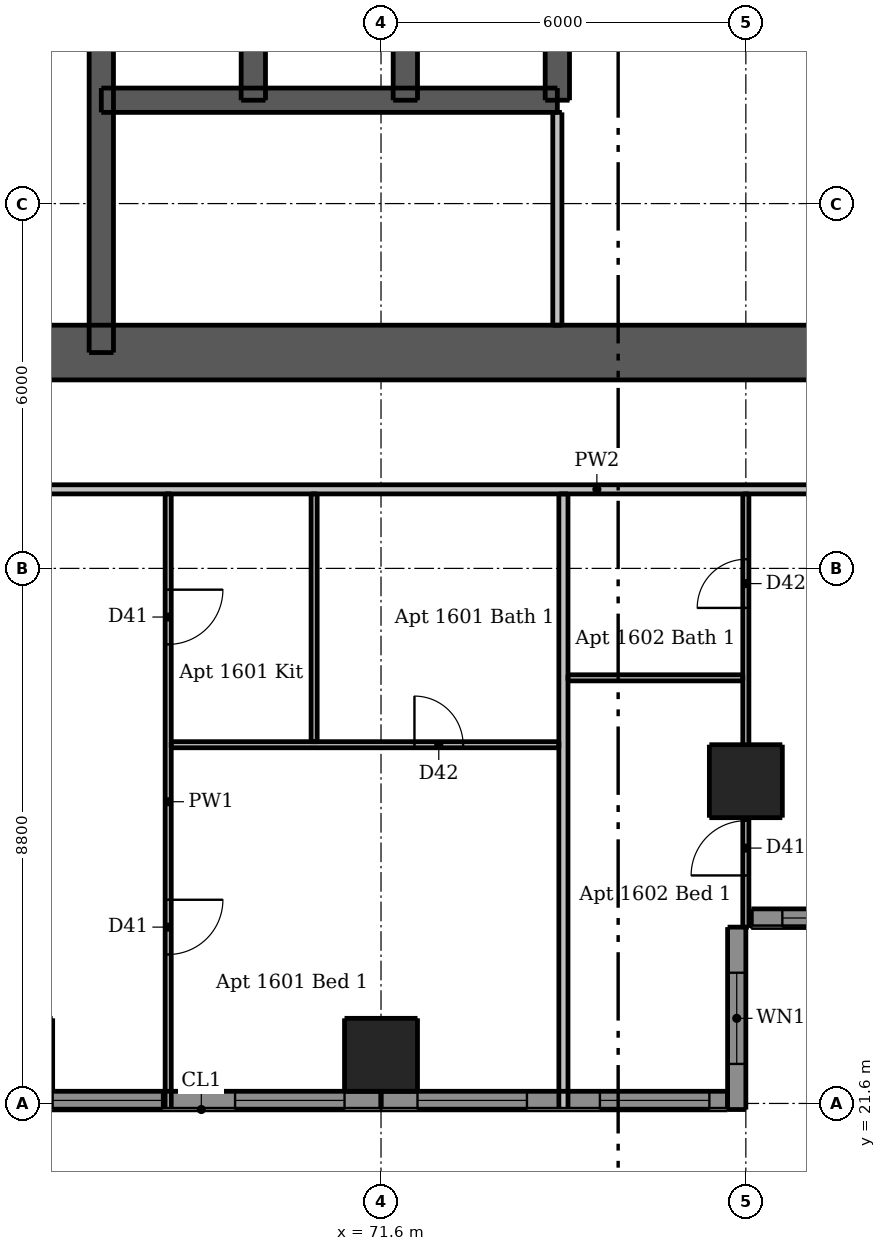
"""IFC4 building model, lengths in metres.
Left out: names, types, materials, properties, quantities, classifications, styles, units other than length and angle.
Written with IfcOpenShell. Run it as: python <this file> out.ifc"""

import sys

from ifc_helpers import new_model, si_unit, direction, frame, frame_2d, origin, origin_2d, place, context, subcontext, project, spatial, rectangle, extrude, element, fill, save


model = new_model("IFC4")
c1 = context("Model", 3, precision=1e-05, world=origin(), true_north=direction((0.0, 1.0)))
c2 = subcontext(c1, "Body", "Model", "MODEL_VIEW")
j1 = project(units=[si_unit("LENGTHUNIT", "METRE"), si_unit("PLANEANGLEUNIT", "RADIAN")], contexts=[c1])
p1 = place(None, origin())
s1 = spatial("IfcSite", under=j1, at=p1, CompositionType="ELEMENT")
p2 = place(p1, origin())
s2 = spatial("IfcBuilding", under=s1, at=p2, CompositionType="ELEMENT")
p3 = place(p2, frame((0.0, 0.0, 59.8)))
s3 = spatial("IfcBuildingStorey", under=s2, at=p3, CompositionType="ELEMENT", Elevation=59.8)
p4 = place(p3, frame((62.5, 33.95, 0.0), z_axis=(0.0, 0.0, 1.0), x_axis=(1.0, 0.0, 0.0)))
e1 = element("IfcWall", 1, at=p4, inside=s3, PredefinedType="SHEAR", context=c2, shape_type="SweptSolid", body=[
    extrude(rectangle(XDim=24.0, YDim=0.9, at=frame_2d((12.0, 0.0))), origin(), (0.0, 0.0, 1.0), 3.05),
])
p5 = place(p4, frame((2.05, 0.0, 0.0)))
e2 = element("IfcOpeningElement", 2, at=p5, cuts=e1, PredefinedType="OPENING", context=c2, shape_type="SweptSolid", body=[
    extrude(rectangle(XDim=1.1, YDim=2.1, at=frame_2d((0.55, 1.05))), frame((0.0, 0.46, 0.0), z_axis=(0.0, -1.0, 0.0), x_axis=(1.0, 0.0, 0.0)), (0.0, 0.0, 1.0), 0.92),
])
p6 = place(p4, frame((20.85, 0.0, 0.0)))
e3 = element("IfcOpeningElement", 3, at=p6, cuts=e1, PredefinedType="OPENING", context=c2, shape_type="SweptSolid", body=[
    extrude(rectangle(XDim=1.1, YDim=2.1, at=frame_2d((0.55, 1.05))), frame((0.0, 0.46, 0.0), z_axis=(0.0, -1.0, 0.0), x_axis=(1.0, 0.0, 0.0)), (0.0, 0.0, 1.0), 0.92),
])
p7 = place(p4, frame((8.0, 0.0, 0.0)))
e4 = element("IfcOpeningElement", 4, at=p7, cuts=e1, PredefinedType="OPENING", context=c2, shape_type="SweptSolid", body=[
    extrude(rectangle(XDim=1.1, YDim=2.1, at=frame_2d((0.55, 1.05))), frame((0.0, 0.46, 0.0), z_axis=(0.0, -1.0, 0.0), x_axis=(1.0, 0.0, 0.0)), (0.0, 0.0, 1.0), 0.92),
])
p8 = place(p4, frame((15.3, 0.0, 0.0)))
e5 = element("IfcOpeningElement", 5, at=p8, cuts=e1, PredefinedType="OPENING", context=c2, shape_type="SweptSolid", body=[
    extrude(rectangle(XDim=0.9, YDim=2.1, at=frame_2d((0.45, 1.05))), frame((0.0, 0.46, 0.0), z_axis=(0.0, -1.0, 0.0), x_axis=(1.0, 0.0, 0.0)), (0.0, 0.0, 1.0), 0.92),
])
p9 = place(p3, frame((67.0, 33.95, 0.0), z_axis=(0.0, 0.0, 1.0), x_axis=(0.0, 1.0, 0.0)))
e6 = element("IfcWall", 6, at=p9, inside=s3, PredefinedType="SHEAR", context=c2, shape_type="SweptSolid", body=[
    extrude(rectangle(XDim=9.95, YDim=0.4, at=frame_2d((4.975, 0.0))), origin(), (0.0, 0.0, 1.0), 3.05),
])
p10 = place(p9, frame((0.65, 0.0, 0.0)))
e7 = element("IfcOpeningElement", 7, at=p10, cuts=e6, PredefinedType="OPENING", context=c2, shape_type="SweptSolid", body=[
    extrude(rectangle(XDim=1.1, YDim=2.1, at=frame_2d((0.55, 1.05))), frame((0.0, 0.21, 0.0), z_axis=(0.0, -1.0, 0.0), x_axis=(1.0, 0.0, 0.0)), (0.0, 0.0, 1.0), 0.42),
])
p11 = place(p3, frame((67.0, 38.1, 0.0), z_axis=(0.0, 0.0, 1.0), x_axis=(1.0, 0.0, 0.0)))
e8 = element("IfcWall", 8, at=p11, inside=s3, PredefinedType="SHEAR", context=c2, shape_type="SweptSolid", body=[
    extrude(rectangle(XDim=7.5, YDim=0.4, at=frame_2d((3.75, 0.0))), origin(), (0.0, 0.0, 1.0), 3.05),
])
p12 = place(p11, frame((0.7, 0.0, 0.0)))
e9 = element("IfcOpeningElement", 9, at=p12, cuts=e8, PredefinedType="OPENING", context=c2, shape_type="SweptSolid", body=[
    extrude(rectangle(XDim=1.1, YDim=2.1, at=frame_2d((0.55, 1.05))), frame((0.0, 0.21, 0.0), z_axis=(0.0, -1.0, 0.0), x_axis=(1.0, 0.0, 0.0)), (0.0, 0.0, 1.0), 0.42),
])
p13 = place(p11, frame((3.2, 0.0, 0.0)))
e10 = element("IfcOpeningElement", 10, at=p13, cuts=e8, PredefinedType="OPENING", context=c2, shape_type="SweptSolid", body=[
    extrude(rectangle(XDim=1.1, YDim=2.1, at=frame_2d((0.55, 1.05))), frame((0.0, 0.21, 0.0), z_axis=(0.0, -1.0, 0.0), x_axis=(1.0, 0.0, 0.0)), (0.0, 0.0, 1.0), 0.42),
])
p14 = place(p11, frame((5.65, 0.0, 0.0)))
e11 = element("IfcOpeningElement", 11, at=p14, cuts=e8, PredefinedType="OPENING", context=c2, shape_type="SweptSolid", body=[
    extrude(rectangle(XDim=1.2, YDim=2.1, at=frame_2d((0.6, 1.05))), frame((0.0, 0.21, 0.0), z_axis=(0.0, -1.0, 0.0), x_axis=(1.0, 0.0, 0.0)), (0.0, 0.0, 1.0), 0.42),
])
for number, where, z_axis, x_axis in (
    (12, (69.5, 38.1, 0.0), (0.0, 0.0, 1.0), (0.0, 1.0, 0.0)),
    (13, (72.0, 38.1, 0.0), (0.0, 0.0, 1.0), (0.0, 1.0, 0.0)),
    (14, (74.5, 38.1, 0.0), (0.0, 0.0, 1.0), (0.0, 1.0, 0.0)),
):
    element("IfcWall", number, at=place(p3, frame(where, z_axis=z_axis, x_axis=x_axis)), inside=s3, PredefinedType="SHEAR", context=c2, shape_type="SweptSolid", body=[
        extrude(rectangle(XDim=2.9, YDim=0.4, at=frame_2d((1.45, 0.0))), origin(), (0.0, 0.0, 1.0), 3.05),
    ])
for number, where, z_axis, x_axis in (
    (15, (65.6, 22.4, 0.0), (0.0, 0.0, 1.0), (1.0, 0.0, 0.0)),
    (16, (71.6, 22.4, 0.0), (0.0, 0.0, 1.0), (1.0, 0.0, 0.0)),
    (17, (77.6, 26.9, 0.0), (0.0, 0.0, 1.0), (1.0, 0.0, 0.0)),
):
    element("IfcColumn", number, at=place(p3, frame(where, z_axis=z_axis, x_axis=x_axis)), inside=s3, PredefinedType="COLUMN", context=c2, shape_type="SweptSolid", body=[
        extrude(rectangle(XDim=1.2, YDim=1.2, at=origin_2d()), origin(), (0.0, 0.0, 1.0), 3.05),
    ])
p15 = place(p3, frame((77.45, 21.5, 0.0), z_axis=(0.0, 0.0, 1.0), x_axis=(0.0, 1.0, 0.0)))
e18 = element("IfcWall", 18, at=p15, inside=s3, PredefinedType="SOLIDWALL", context=c2, shape_type="SweptSolid", body=[
    extrude(rectangle(XDim=3.0, YDim=0.3, at=frame_2d((1.5, 0.0))), origin(), (0.0, 0.0, 1.0), 3.05),
])
p16 = place(p15, frame((0.75, 0.0, 0.9)))
e19 = element("IfcOpeningElement", 19, at=p16, cuts=e18, PredefinedType="OPENING", context=c2, shape_type="SweptSolid", body=[
    extrude(rectangle(XDim=1.5, YDim=1.5, at=frame_2d((0.75, 0.75))), frame((0.0, 0.16, 0.0), z_axis=(0.0, -1.0, 0.0), x_axis=(1.0, 0.0, 0.0)), (0.0, 0.0, 1.0), 0.32),
])
p17 = place(p3, frame((65.6, 21.65, 0.0), z_axis=(0.0, 0.0, 1.0), x_axis=(1.0, 0.0, 0.0)))
e20 = element("IfcWall", 20, at=p17, inside=s3, PredefinedType="SOLIDWALL", context=c2, shape_type="SweptSolid", body=[
    extrude(rectangle(XDim=6.0, YDim=0.3, at=frame_2d((3.0, 0.0))), origin(), (0.0, 0.0, 1.0), 3.05),
])
p18 = place(p17, frame((0.6, 0.0, 0.15)))
e21 = element("IfcOpeningElement", 21, at=p18, cuts=e20, PredefinedType="OPENING", context=c2, shape_type="SweptSolid", body=[
    extrude(rectangle(XDim=1.8, YDim=2.1, at=frame_2d((0.9, 1.05))), frame((0.0, 0.16, 0.0), z_axis=(0.0, -1.0, 0.0), x_axis=(1.0, 0.0, 0.0)), (0.0, 0.0, 1.0), 0.32),
])
p19 = place(p17, frame((3.6, 0.0, 0.15)))
e22 = element("IfcOpeningElement", 22, at=p19, cuts=e20, PredefinedType="OPENING", context=c2, shape_type="SweptSolid", body=[
    extrude(rectangle(XDim=1.8, YDim=2.1, at=frame_2d((0.9, 1.05))), frame((0.0, 0.16, 0.0), z_axis=(0.0, -1.0, 0.0), x_axis=(1.0, 0.0, 0.0)), (0.0, 0.0, 1.0), 0.32),
])
p20 = place(p3, frame((71.6, 21.65, 0.0), z_axis=(0.0, 0.0, 1.0), x_axis=(1.0, 0.0, 0.0)))
e23 = element("IfcWall", 23, at=p20, inside=s3, PredefinedType="SOLIDWALL", context=c2, shape_type="SweptSolid", body=[
    extrude(rectangle(XDim=5.7, YDim=0.3, at=frame_2d((2.85, 0.0))), origin(), (0.0, 0.0, 1.0), 3.05),
])
p21 = place(p20, frame((0.6, 0.0, 0.15)))
e24 = element("IfcOpeningElement", 24, at=p21, cuts=e23, PredefinedType="OPENING", context=c2, shape_type="SweptSolid", body=[
    extrude(rectangle(XDim=1.8, YDim=2.1, at=frame_2d((0.9, 1.05))), frame((0.0, 0.16, 0.0), z_axis=(0.0, -1.0, 0.0), x_axis=(1.0, 0.0, 0.0)), (0.0, 0.0, 1.0), 0.32),
])
p22 = place(p20, frame((3.6, 0.0, 0.15)))
e25 = element("IfcOpeningElement", 25, at=p22, cuts=e23, PredefinedType="OPENING", context=c2, shape_type="SweptSolid", body=[
    extrude(rectangle(XDim=1.8, YDim=2.1, at=frame_2d((0.9, 1.05))), frame((0.0, 0.16, 0.0), z_axis=(0.0, -1.0, 0.0), x_axis=(1.0, 0.0, 0.0)), (0.0, 0.0, 1.0), 0.32),
])
p23 = place(p3, frame((77.69, 24.65, 0.0), z_axis=(0.0, 0.0, 1.0), x_axis=(1.0, 0.0, 0.0)))
e26 = element("IfcWall", 26, at=p23, inside=s3, PredefinedType="SOLIDWALL", context=c2, shape_type="SweptSolid", body=[
    extrude(rectangle(XDim=5.61, YDim=0.3, at=frame_2d((2.805, 0.0))), origin(), (0.0, 0.0, 1.0), 3.05),
])
p24 = place(p23, frame((0.51, 0.0, 0.15)))
e27 = element("IfcOpeningElement", 27, at=p24, cuts=e26, PredefinedType="OPENING", context=c2, shape_type="SweptSolid", body=[
    extrude(rectangle(XDim=1.8, YDim=2.1, at=frame_2d((0.9, 1.05))), frame((0.0, 0.16, 0.0), z_axis=(0.0, -1.0, 0.0), x_axis=(1.0, 0.0, 0.0)), (0.0, 0.0, 1.0), 0.32),
])
p25 = place(p23, frame((3.51, 0.0, 0.15)))
e28 = element("IfcOpeningElement", 28, at=p25, cuts=e26, PredefinedType="OPENING", context=c2, shape_type="SweptSolid", body=[
    extrude(rectangle(XDim=1.8, YDim=2.1, at=frame_2d((0.9, 1.05))), frame((0.0, 0.16, 0.0), z_axis=(0.0, -1.0, 0.0), x_axis=(1.0, 0.0, 0.0)), (0.0, 0.0, 1.0), 0.32),
])
p26 = place(p3, frame((74.5, 34.4, 0.0), z_axis=(0.0, 0.0, 1.0), x_axis=(0.0, 1.0, 0.0)))
e29 = element("IfcWall", 29, at=p26, inside=s3, PredefinedType="PLUMBINGWALL", context=c2, shape_type="SweptSolid", body=[
    extrude(rectangle(XDim=3.5, YDim=0.15, at=frame_2d((1.75, 0.0))), origin(), (0.0, 0.0, 1.0), 3.05),
])
p27 = place(p3, frame((68.1, 31.625, 0.0), z_axis=(0.0, 0.0, 1.0), x_axis=(0.0, -1.0, 0.0)))
e30 = element("IfcWall", 30, at=p27, inside=s3, PredefinedType="PARTITIONING", context=c2, shape_type="SweptSolid", body=[
    extrude(rectangle(XDim=10.125, YDim=0.1, at=frame_2d((5.062, 0.0))), origin(), (0.0, 0.0, 1.0), 3.05),
])
p28 = place(p27, frame((1.575, 0.0, 0.0)))
e31 = element("IfcOpeningElement", 31, at=p28, cuts=e30, PredefinedType="OPENING", context=c2, shape_type="SweptSolid", body=[
    extrude(rectangle(XDim=0.9, YDim=2.1, at=frame_2d((0.45, 1.05))), frame((0.0, 0.06, 0.0), z_axis=(0.0, -1.0, 0.0), x_axis=(1.0, 0.0, 0.0)), (0.0, 0.0, 1.0), 0.12),
])
p29 = place(p27, frame((6.675, 0.0, 0.0)))
e32 = element("IfcOpeningElement", 32, at=p29, cuts=e30, PredefinedType="OPENING", context=c2, shape_type="SweptSolid", body=[
    extrude(rectangle(XDim=0.9, YDim=2.1, at=frame_2d((0.45, 1.05))), frame((0.0, 0.06, 0.0), z_axis=(0.0, -1.0, 0.0), x_axis=(1.0, 0.0, 0.0)), (0.0, 0.0, 1.0), 0.12),
])
p30 = place(p3, frame((70.5, 27.55, 0.0), z_axis=(0.0, 0.0, 1.0), x_axis=(0.0, 1.0, 0.0)))
e33 = element("IfcWall", 33, at=p30, inside=s3, PredefinedType="PARTITIONING", context=c2, shape_type="SweptSolid", body=[
    extrude(rectangle(XDim=4.075, YDim=0.1, at=frame_2d((2.038, 0.0))), origin(), (0.0, 0.0, 1.0), 3.05),
])
p31 = place(p3, frame((77.6, 24.5, 0.0), z_axis=(0.0, 0.0, 1.0), x_axis=(0.0, 1.0, 0.0)))
e34 = element("IfcWall", 34, at=p31, inside=s3, PredefinedType="PARTITIONING", context=c2, shape_type="SweptSolid", body=[
    extrude(rectangle(XDim=7.125, YDim=0.1, at=frame_2d((3.562, 0.0))), origin(), (0.0, 0.0, 1.0), 2.59),
])
p32 = place(p31, frame((0.85, 0.0, 0.0)))
e35 = element("IfcOpeningElement", 35, at=p32, cuts=e34, PredefinedType="OPENING", context=c2, shape_type="SweptSolid", body=[
    extrude(rectangle(XDim=0.9, YDim=2.1, at=frame_2d((0.45, 1.05))), frame((0.0, 0.06, 0.0), z_axis=(0.0, -1.0, 0.0), x_axis=(1.0, 0.0, 0.0)), (0.0, 0.0, 1.0), 0.12),
])
p33 = place(p31, frame((5.25, 0.0, 0.0)))
e36 = element("IfcOpeningElement", 36, at=p33, cuts=e34, PredefinedType="OPENING", context=c2, shape_type="SweptSolid", body=[
    extrude(rectangle(XDim=0.8, YDim=2.1, at=frame_2d((0.4, 1.05))), frame((0.0, 0.06, 0.0), z_axis=(0.0, -1.0, 0.0), x_axis=(1.0, 0.0, 0.0)), (0.0, 0.0, 1.0), 0.12),
])
p34 = place(p3, frame((74.675, 28.6, 0.0), z_axis=(0.0, 0.0, 1.0), x_axis=(1.0, 0.0, 0.0)))
e37 = element("IfcWall", 37, at=p34, inside=s3, PredefinedType="PARTITIONING", context=c2, shape_type="SweptSolid", body=[
    extrude(rectangle(XDim=2.875, YDim=0.1, at=frame_2d((1.438, 0.0))), origin(), (0.0, 0.0, 1.0), 3.05),
])
p35 = place(p3, frame((68.15, 27.5, 0.0), z_axis=(0.0, 0.0, 1.0), x_axis=(1.0, 0.0, 0.0)))
e38 = element("IfcWall", 38, at=p35, inside=s3, PredefinedType="PARTITIONING", context=c2, shape_type="SweptSolid", body=[
    extrude(rectangle(XDim=6.375, YDim=0.1, at=frame_2d((3.188, 0.0))), origin(), (0.0, 0.0, 1.0), 3.05),
])
p36 = place(p35, frame((4.0, 0.0, 0.0)))
e39 = element("IfcOpeningElement", 39, at=p36, cuts=e38, PredefinedType="OPENING", context=c2, shape_type="SweptSolid", body=[
    extrude(rectangle(XDim=0.8, YDim=2.1, at=frame_2d((0.4, 1.05))), frame((0.0, 0.06, 0.0), z_axis=(0.0, -1.0, 0.0), x_axis=(1.0, 0.0, 0.0)), (0.0, 0.0, 1.0), 0.12),
])
p37 = place(p3, frame((74.6, 21.5, 0.0), z_axis=(0.0, 0.0, 1.0), x_axis=(0.0, 1.0, 0.0)))
e40 = element("IfcWall", 40, at=p37, inside=s3, PredefinedType="PARTITIONING", context=c2, shape_type="SweptSolid", body=[
    extrude(rectangle(XDim=10.125, YDim=0.15, at=frame_2d((5.062, 0.0))), origin(), (0.0, 0.0, 1.0), 3.05),
])
p38 = place(p3, frame((89.525, 31.7, 0.0), z_axis=(0.0, 0.0, 1.0), x_axis=(-1.0, 0.0, 0.0)))
e41 = element("IfcWall", 41, at=p38, inside=s3, PredefinedType="PARTITIONING", context=c2, shape_type="SweptSolid", body=[
    extrude(rectangle(XDim=28.75, YDim=0.15, at=frame_2d((14.375, 0.0))), origin(), (0.0, 0.0, 1.0), 3.05),
])
p39 = place(p38, frame((24.625, 0.0, 0.0)))
e42 = element("IfcOpeningElement", 42, at=p39, cuts=e41, PredefinedType="OPENING", context=c2, shape_type="SweptSolid", body=[
    extrude(rectangle(XDim=1.0, YDim=2.1, at=frame_2d((0.5, 1.05))), frame((0.0, 0.085, 0.0), z_axis=(0.0, -1.0, 0.0), x_axis=(1.0, 0.0, 0.0)), (0.0, 0.0, 1.0), 0.17),
])
p40 = place(p38, frame((8.425, 0.0, 0.0)))
e43 = element("IfcOpeningElement", 43, at=p40, cuts=e41, PredefinedType="OPENING", context=c2, shape_type="SweptSolid", body=[
    extrude(rectangle(XDim=1.0, YDim=2.1, at=frame_2d((0.5, 1.05))), frame((0.0, 0.085, 0.0), z_axis=(0.0, -1.0, 0.0), x_axis=(1.0, 0.0, 0.0)), (0.0, 0.0, 1.0), 0.17),
])
p41 = place(p16, origin())
e44 = element("IfcWindow", 44, at=p41, inside=s3, PartitioningType="DOUBLE_PANEL_VERTICAL", PredefinedType="WINDOW", context=c2, shape_type="SweptSolid", body=[
    extrude(rectangle(XDim=1.5, YDim=1.5, at=frame_2d((0.75, 0.75))), frame((0.0, 0.03, 0.0), z_axis=(0.0, -1.0, 0.0), x_axis=(1.0, 0.0, 0.0)), (0.0, 0.0, 1.0), 0.06),
])
fill(e19, e44)
p42 = place(p18, origin())
e45 = element("IfcWindow", 45, at=p42, inside=s3, PartitioningType="DOUBLE_PANEL_VERTICAL", PredefinedType="WINDOW", context=c2, shape_type="SweptSolid", body=[
    extrude(rectangle(XDim=1.8, YDim=2.1, at=frame_2d((0.9, 1.05))), frame((0.0, 0.03, 0.0), z_axis=(0.0, -1.0, 0.0), x_axis=(1.0, 0.0, 0.0)), (0.0, 0.0, 1.0), 0.06),
])
fill(e21, e45)
p43 = place(p19, origin())
e46 = element("IfcWindow", 46, at=p43, inside=s3, PartitioningType="DOUBLE_PANEL_VERTICAL", PredefinedType="WINDOW", context=c2, shape_type="SweptSolid", body=[
    extrude(rectangle(XDim=1.8, YDim=2.1, at=frame_2d((0.9, 1.05))), frame((0.0, 0.03, 0.0), z_axis=(0.0, -1.0, 0.0), x_axis=(1.0, 0.0, 0.0)), (0.0, 0.0, 1.0), 0.06),
])
fill(e22, e46)
p44 = place(p21, origin())
e47 = element("IfcWindow", 47, at=p44, inside=s3, PartitioningType="DOUBLE_PANEL_VERTICAL", PredefinedType="WINDOW", context=c2, shape_type="SweptSolid", body=[
    extrude(rectangle(XDim=1.8, YDim=2.1, at=frame_2d((0.9, 1.05))), frame((0.0, 0.03, 0.0), z_axis=(0.0, -1.0, 0.0), x_axis=(1.0, 0.0, 0.0)), (0.0, 0.0, 1.0), 0.06),
])
fill(e24, e47)
p45 = place(p22, origin())
e48 = element("IfcWindow", 48, at=p45, inside=s3, PartitioningType="DOUBLE_PANEL_VERTICAL", PredefinedType="WINDOW", context=c2, shape_type="SweptSolid", body=[
    extrude(rectangle(XDim=1.8, YDim=2.1, at=frame_2d((0.9, 1.05))), frame((0.0, 0.03, 0.0), z_axis=(0.0, -1.0, 0.0), x_axis=(1.0, 0.0, 0.0)), (0.0, 0.0, 1.0), 0.06),
])
fill(e25, e48)
p46 = place(p24, origin())
e49 = element("IfcWindow", 49, at=p46, inside=s3, PartitioningType="DOUBLE_PANEL_VERTICAL", PredefinedType="WINDOW", context=c2, shape_type="SweptSolid", body=[
    extrude(rectangle(XDim=1.8, YDim=2.1, at=frame_2d((0.9, 1.05))), frame((0.0, 0.03, 0.0), z_axis=(0.0, -1.0, 0.0), x_axis=(1.0, 0.0, 0.0)), (0.0, 0.0, 1.0), 0.06),
])
fill(e27, e49)
p47 = place(p7, origin())
e50 = element("IfcDoor", 50, at=p47, inside=s3, OperationType="SINGLE_SWING_LEFT", PredefinedType="DOOR", context=c2, shape_type="SweptSolid", body=[
    extrude(rectangle(XDim=1.1, YDim=2.1, at=frame_2d((0.55, 1.05))), frame((0.0, 0.438, 0.0), z_axis=(0.0, -1.0, 0.0), x_axis=(1.0, 0.0, 0.0)), (0.0, 0.0, 1.0), 0.05),
])
fill(e4, e50)
p48 = place(p10, origin())
e51 = element("IfcDoor", 51, at=p48, inside=s3, OperationType="SINGLE_SWING_RIGHT", PredefinedType="DOOR", context=c2, shape_type="SweptSolid", body=[
    extrude(rectangle(XDim=1.1, YDim=2.1, at=frame_2d((0.55, 1.05))), frame((0.0, -0.138, 0.0), z_axis=(0.0, -1.0, 0.0), x_axis=(1.0, 0.0, 0.0)), (0.0, 0.0, 1.0), 0.05),
])
fill(e7, e51)
p49 = place(p8, origin())
e52 = element("IfcDoor", 52, at=p49, inside=s3, OperationType="SINGLE_SWING_LEFT", PredefinedType="DOOR", context=c2, shape_type="SweptSolid", body=[
    extrude(rectangle(XDim=0.9, YDim=2.1, at=frame_2d((0.45, 1.05))), frame((0.0, 0.438, 0.0), z_axis=(0.0, -1.0, 0.0), x_axis=(1.0, 0.0, 0.0)), (0.0, 0.0, 1.0), 0.05),
])
fill(e5, e52)
p50 = place(p12, origin())
e53 = element("IfcDoor", 53, at=p50, inside=s3, OperationType="DOUBLE_DOOR_SLIDING", PredefinedType="DOOR", context=c2, shape_type="SweptSolid", body=[
    extrude(rectangle(XDim=1.1, YDim=2.1, at=frame_2d((0.55, 1.05))), frame((0.0, 0.025, 0.0), z_axis=(0.0, -1.0, 0.0), x_axis=(1.0, 0.0, 0.0)), (0.0, 0.0, 1.0), 0.05),
])
fill(e9, e53)
p51 = place(p13, origin())
e54 = element("IfcDoor", 54, at=p51, inside=s3, OperationType="DOUBLE_DOOR_SLIDING", PredefinedType="DOOR", context=c2, shape_type="SweptSolid", body=[
    extrude(rectangle(XDim=1.1, YDim=2.1, at=frame_2d((0.55, 1.05))), frame((0.0, 0.025, 0.0), z_axis=(0.0, -1.0, 0.0), x_axis=(1.0, 0.0, 0.0)), (0.0, 0.0, 1.0), 0.05),
])
fill(e10, e54)
p52 = place(p14, origin())
e55 = element("IfcDoor", 55, at=p52, inside=s3, OperationType="DOUBLE_DOOR_SLIDING", PredefinedType="DOOR", context=c2, shape_type="SweptSolid", body=[
    extrude(rectangle(XDim=1.2, YDim=2.1, at=frame_2d((0.6, 1.05))), frame((0.0, 0.025, 0.0), z_axis=(0.0, -1.0, 0.0), x_axis=(1.0, 0.0, 0.0)), (0.0, 0.0, 1.0), 0.05),
])
fill(e11, e55)
p53 = place(p28, origin())
e56 = element("IfcDoor", 56, at=p53, inside=s3, OperationType="SINGLE_SWING_LEFT", PredefinedType="DOOR", context=c2, shape_type="SweptSolid", body=[
    extrude(rectangle(XDim=0.9, YDim=2.1, at=frame_2d((0.45, 1.05))), frame((0.0, 0.025, 0.0), z_axis=(0.0, -1.0, 0.0), x_axis=(1.0, 0.0, 0.0)), (0.0, 0.0, 1.0), 0.05),
])
fill(e31, e56)
p54 = place(p29, origin())
e57 = element("IfcDoor", 57, at=p54, inside=s3, OperationType="SINGLE_SWING_LEFT", PredefinedType="DOOR", context=c2, shape_type="SweptSolid", body=[
    extrude(rectangle(XDim=0.9, YDim=2.1, at=frame_2d((0.45, 1.05))), frame((0.0, 0.025, 0.0), z_axis=(0.0, -1.0, 0.0), x_axis=(1.0, 0.0, 0.0)), (0.0, 0.0, 1.0), 0.05),
])
fill(e32, e57)
p55 = place(p36, origin())
e58 = element("IfcDoor", 58, at=p55, inside=s3, OperationType="SINGLE_SWING_LEFT", PredefinedType="DOOR", context=c2, shape_type="SweptSolid", body=[
    extrude(rectangle(XDim=0.8, YDim=2.1, at=frame_2d((0.4, 1.05))), frame((0.0, 0.025, 0.0), z_axis=(0.0, -1.0, 0.0), x_axis=(1.0, 0.0, 0.0)), (0.0, 0.0, 1.0), 0.05),
])
fill(e39, e58)
p56 = place(p32, origin())
e59 = element("IfcDoor", 59, at=p56, inside=s3, OperationType="SINGLE_SWING_LEFT", PredefinedType="DOOR", context=c2, shape_type="SweptSolid", body=[
    extrude(rectangle(XDim=0.9, YDim=2.1, at=frame_2d((0.45, 1.05))), frame((0.0, 0.025, 0.0), z_axis=(0.0, -1.0, 0.0), x_axis=(1.0, 0.0, 0.0)), (0.0, 0.0, 1.0), 0.05),
])
fill(e35, e59)
p57 = place(p33, origin())
e60 = element("IfcDoor", 60, at=p57, inside=s3, OperationType="SINGLE_SWING_LEFT", PredefinedType="DOOR", context=c2, shape_type="SweptSolid", body=[
    extrude(rectangle(XDim=0.8, YDim=2.1, at=frame_2d((0.4, 1.05))), frame((0.0, 0.025, 0.0), z_axis=(0.0, -1.0, 0.0), x_axis=(1.0, 0.0, 0.0)), (0.0, 0.0, 1.0), 0.05),
])
fill(e36, e60)
save(model, sys.argv[1])
